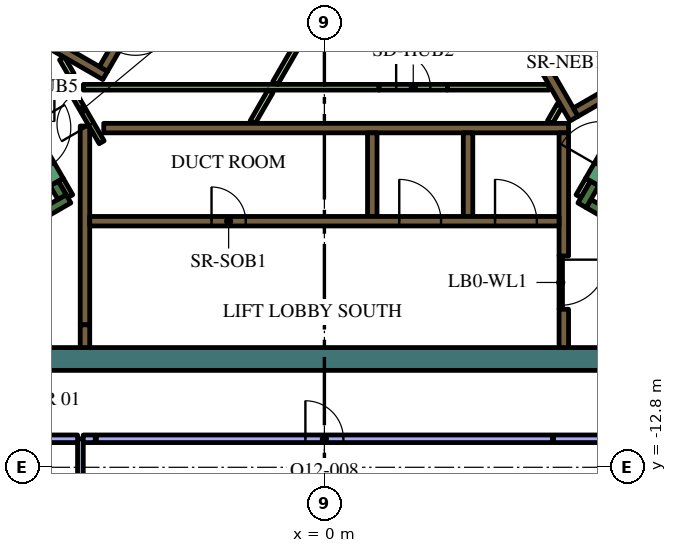
"""IFC4 building model, lengths in metres.
Left out: names, types, materials, properties, quantities, classifications, styles, units other than length and angle.
Written with IfcOpenShell. Run it as: python <this file> out.ifc"""

import sys

from ifc_helpers import new_model, si_unit, direction, frame, frame_2d, origin, place, context, subcontext, project, spatial, polyline, rectangle, outline, extrude, element, fill, save


model = new_model("IFC4")
c1 = context("Model", 3, precision=1e-05, world=origin(), true_north=direction((0.0, 1.0)))
c2 = subcontext(c1, "Body", "Model", "MODEL_VIEW")
j1 = project(units=[si_unit("LENGTHUNIT", "METRE"), si_unit("PLANEANGLEUNIT", "RADIAN")], contexts=[c1])
p1 = place(None, origin())
s1 = spatial("IfcSite", under=j1, at=p1, CompositionType="ELEMENT")
p2 = place(p1, origin())
s2 = spatial("IfcBuilding", under=s1, at=p2, CompositionType="ELEMENT")
p3 = place(p2, frame((0.0, 0.0, 283.8)))
s3 = spatial("IfcBuildingStorey", under=s2, at=p3, CompositionType="ELEMENT", Elevation=283.8)
p4 = place(p3, origin())
e1 = element("IfcWall", 1, at=p4, inside=s3, PredefinedType="SOLIDWALL", context=c2, shape_type="SweptSolid", body=[
    extrude(outline(polyline([(-15.502, -6.35), (-4.912, 11.992), (-4.393, 11.692), (-10.815, 0.569), (-10.84, 0.583), (-10.84, 0.583), (-10.84, 0.583), (-10.965, 0.367), (-10.965, 0.367), (-10.965, 0.367), (-10.94, 0.352), (-11.033, 0.191), (-14.809, -6.35), (-15.156, -6.95), (-15.502, -6.35)])), origin(), (0.0, 0.0, 1.0), 4.2),
])
p5 = place(p3, frame((-10.556, -9.95, 0.0), z_axis=(0.0, 0.0, 1.0), x_axis=(1.0, 0.0, 0.0)))
e2 = element("IfcWall", 2, at=p5, inside=s3, PredefinedType="SOLIDWALL", context=c2, shape_type="SweptSolid", body=[
    extrude(rectangle(XDim=19.461, YDim=0.6, at=frame_2d((9.73, 0.0))), origin(), (0.0, 0.0, 1.0), 4.2),
])
p6 = place(p3, frame((12.84, -9.261, 0.0), z_axis=(0.0, 0.0, 1.0), x_axis=(-0.866013990052, 0.500019768644, 0.0)))
e3 = element("IfcWall", 3, at=p6, inside=s3, PredefinedType="SOLIDWALL", context=c2, shape_type="SweptSolid", body=[
    extrude(rectangle(XDim=6.8, YDim=0.25, at=frame_2d((3.4, 0.0))), origin(), (0.0, 0.0, 1.0), 4.2),
])
p7 = place(p3, frame((7.113, -5.33, 0.0), z_axis=(0.0, 0.0, 1.0), x_axis=(-0.499965889992, -0.866045096311, 0.0)))
e4 = element("IfcWall", 4, at=p7, inside=s3, PredefinedType="SOLIDWALL", context=c2, shape_type="SweptSolid", body=[
    extrude(rectangle(XDim=0.666, YDim=0.25, at=frame_2d((0.333, 0.0))), origin(), (0.0, 0.0, 1.0), 4.2),
])
p8 = place(p3, frame((-12.84, -9.261, 0.0), z_axis=(0.0, 0.0, 1.0), x_axis=(0.866016039709, 0.500016218704, 0.0)))
e5 = element("IfcWall", 5, at=p8, inside=s3, PredefinedType="SOLIDWALL", context=c2, shape_type="SweptSolid", body=[
    extrude(rectangle(XDim=7.05, YDim=0.25, at=frame_2d((3.525, 0.0))), origin(), (0.0, 0.0, 1.0), 4.2),
])
p9 = place(p3, frame((-6.905, -5.69, 0.0), z_axis=(0.0, 0.0, 1.0), x_axis=(-0.499993700073, 0.866029041019, 0.0)))
e6 = element("IfcWall", 6, at=p9, inside=s3, PredefinedType="SOLIDWALL", context=c2, shape_type="SweptSolid", body=[
    extrude(rectangle(XDim=0.416, YDim=0.25, at=frame_2d((0.208, 0.0))), origin(), (0.0, 0.0, 1.0), 4.2),
])
p10 = place(p3, frame((-5.806, -3.875, 0.0), z_axis=(0.0, 0.0, 1.0), x_axis=(1.0, 0.0, 0.0)))
e7 = element("IfcWall", 7, at=p10, inside=s3, PredefinedType="SOLIDWALL", context=c2, shape_type="SweptSolid", body=[
    extrude(rectangle(XDim=12.231, YDim=0.25, at=frame_2d((6.116, 0.0))), origin(), (0.0, 0.0, 1.0), 4.2),
])
p11 = place(p3, frame((6.3, -7.24, 0.0), z_axis=(0.0, 0.0, 1.0), x_axis=(0.0, 1.0, 0.0)))
e8 = element("IfcWall", 8, at=p11, inside=s3, PredefinedType="SOLIDWALL", context=c2, shape_type="SweptSolid", body=[
    extrude(rectangle(XDim=3.24, YDim=0.25, at=frame_2d((1.62, 0.0))), origin(), (0.0, 0.0, 1.0), 4.2),
])
p12 = place(p3, frame((6.3, -9.65, 0.0), z_axis=(0.0, 0.0, 1.0), x_axis=(0.0, 1.0, 0.0)))
e9 = element("IfcWall", 9, at=p12, inside=s3, PredefinedType="SOLIDWALL", context=c2, shape_type="SweptSolid", body=[
    extrude(rectangle(XDim=1.008, YDim=0.25, at=frame_2d((0.504, 0.0))), origin(), (0.0, 0.0, 1.0), 4.2),
])
for number, where, z_axis, x_axis in (
    (10, (3.78, -4.0, 0.0), (0.0, 0.0, 1.0), (0.0, -1.0, 0.0)),
    (11, (1.26, -4.0, 0.0), (0.0, 0.0, 1.0), (0.0, -1.0, 0.0)),
):
    element("IfcWall", number, at=place(p3, frame(where, z_axis=z_axis, x_axis=x_axis)), inside=s3, PredefinedType="SOLIDWALL", context=c2, shape_type="SweptSolid", body=[
        extrude(rectangle(XDim=2.2, YDim=0.25, at=frame_2d((1.1, 0.0))), origin(), (0.0, 0.0, 1.0), 4.2),
    ])
p13 = place(p3, frame((-6.3, -9.05, 0.0), z_axis=(0.0, 0.0, 1.0), x_axis=(0.0, 1.0, 0.0)))
e12 = element("IfcWall", 12, at=p13, inside=s3, PredefinedType="SOLIDWALL", context=c2, shape_type="SweptSolid", body=[
    extrude(rectangle(XDim=5.23, YDim=0.25, at=frame_2d((2.615, 0.0))), origin(), (0.0, 0.0, 1.0), 4.2),
])
p14 = place(p3, frame((-6.3, -9.052, 0.0), z_axis=(0.0, 0.0, 1.0), x_axis=(0.0, -1.0, 0.0)))
e13 = element("IfcWall", 13, at=p14, inside=s3, PredefinedType="SOLIDWALL", context=c2, shape_type="SweptSolid", body=[
    extrude(rectangle(XDim=0.598, YDim=0.25, at=frame_2d((0.299, 0.0))), origin(), (0.0, 0.0, 1.0), 4.2),
])
e14 = element("IfcWall", 14, at=p4, inside=s3, PredefinedType="SOLIDWALL", context=c2, shape_type="SweptSolid", body=[
    extrude(outline(polyline([(0.332, 6.925), (0.335, 6.925), (0.335, 6.925), (0.335, 6.925), (0.335, 7.075), (0.335, 7.075), (0.335, 7.075), (0.245, 7.075), (0.035, 7.439), (0.252, 7.564), (0.377, 7.348), (1.512, 5.382), (1.637, 5.165), (2.221, 4.153), (2.771, 3.199), (2.896, 2.983), (3.138, 2.564), (4.031, 1.017), (4.156, 0.801), (5.292, -1.165), (5.417, -1.382), (6.073, -2.519), (6.552, -3.348), (6.677, -3.564), (6.46, -3.689), (0.332, 6.925)])), origin(), (0.0, 0.0, 1.0), 4.2),
])
p15 = place(p3, frame((11.507, -0.631, 0.0), z_axis=(0.0, 0.0, 1.0), x_axis=(-0.866011447264, -0.500024172624, 0.0)))
e15 = element("IfcWall", 15, at=p15, inside=s3, PredefinedType="SOLIDWALL", context=c2, shape_type="SweptSolid", body=[
    extrude(rectangle(XDim=5.65, YDim=0.25, at=frame_2d((2.825, 0.0))), origin(), (0.0, 0.0, 1.0), 4.2),
])
p16 = place(p3, frame((-7.889, -1.265, 0.0), z_axis=(0.0, 0.0, 1.0), x_axis=(0.866057815567, -0.499943856944, 0.0)))
e16 = element("IfcWall", 16, at=p16, inside=s3, PredefinedType="SOLIDWALL", context=c2, shape_type="SweptSolid", body=[
    extrude(rectangle(XDim=2.45, YDim=0.25, at=frame_2d((1.225, 0.0))), origin(), (0.0, 0.0, 1.0), 4.2),
])
p17 = place(p3, frame((1.438, -2.8, 0.0), z_axis=(0.0, 0.0, 1.0), x_axis=(-1.0, 0.0, 0.0)))
e17 = element("IfcWall", 17, at=p17, inside=s3, PredefinedType="PARTITIONING", context=c2, shape_type="SweptSolid", body=[
    extrude(rectangle(XDim=7.781, YDim=0.15, at=frame_2d((3.891, 0.0))), origin(), (0.0, 0.0, 1.0), 3.55),
])
p18 = place(p3, frame((-1.418, -2.907, 0.0), z_axis=(0.0, 0.0, 1.0), x_axis=(-0.499978056798, -0.866038072327, 0.0)))
e18 = element("IfcWall", 18, at=p18, inside=s3, PredefinedType="PARTITIONING", context=c2, shape_type="SweptSolid", body=[
    extrude(rectangle(XDim=0.937, YDim=0.15, at=frame_2d((0.469, 0.0))), origin(), (0.0, 0.0, 1.0), 3.55),
])
for number, where, z_axis, x_axis in (
    (19, (-1.295, -2.693, 0.0), (0.0, 0.0, 1.0), (0.5, 0.866, 0.0)),
    (20, (3.238, -2.8, 0.0), (0.0, 0.0, 1.0), (1.0, 0.0, 0.0)),
):
    element("IfcWall", number, at=place(p3, frame(where, z_axis=z_axis, x_axis=x_axis)), inside=s3, PredefinedType="PARTITIONING", context=c2, shape_type="SweptSolid", body=[
        extrude(rectangle(XDim=2.672, YDim=0.15, at=frame_2d((1.336, 0.0))), origin(), (0.0, 0.0, 1.0), 3.55),
    ])
p19 = place(p3, frame((-6.653, -2.477, 0.0), z_axis=(0.0, 0.0, 1.0), x_axis=(-0.500002592159, 0.866023907196, 0.0)))
e21 = element("IfcWall", 21, at=p19, inside=s3, PredefinedType="PARTITIONING", context=c2, shape_type="SweptSolid", body=[
    extrude(rectangle(XDim=0.503, YDim=0.15, at=frame_2d((0.251, 0.0))), origin(), (0.0, 0.0, 1.0), 3.55),
])
p20 = place(p3, frame((-6.94, -5.23, 0.0), z_axis=(0.0, 0.0, 1.0), x_axis=(0.499834152157, -0.86612113491, 0.0)))
e22 = element("IfcWall", 22, at=p20, inside=s3, PredefinedType="PARTITIONING", context=c2, shape_type="SweptSolid", body=[
    extrude(rectangle(XDim=0.505, YDim=0.15, at=frame_2d((0.252, 0.0))), origin(), (0.0, 0.0, 1.0), 4.2),
])
p21 = place(p3, frame((6.688, -5.667, 0.0), z_axis=(0.0, 0.0, 1.0), x_axis=(0.499834152157, 0.86612113491, 0.0)))
e23 = element("IfcWall", 23, at=p21, inside=s3, PredefinedType="PARTITIONING", context=c2, shape_type="SweptSolid", body=[
    extrude(rectangle(XDim=0.505, YDim=0.15, at=frame_2d((0.252, 0.0))), origin(), (0.0, 0.0, 1.0), 3.55),
])
p22 = place(p3, frame((5.936, -3.718, 0.0), z_axis=(0.0, 0.0, 1.0), x_axis=(0.499890179513, 0.866088799389, 0.0)))
e24 = element("IfcWall", 24, at=p22, inside=s3, PredefinedType="PARTITIONING", context=c2, shape_type="SweptSolid", body=[
    extrude(rectangle(XDim=0.504, YDim=0.15, at=frame_2d((0.252, 0.0))), origin(), (0.0, 0.0, 1.0), 3.55),
])
p23 = place(p3, frame((-6.175, -6.325, 0.0), z_axis=(0.0, 0.0, 1.0), x_axis=(1.0, 0.0, 0.0)))
e25 = element("IfcWall", 25, at=p23, inside=s3, PredefinedType="SOLIDWALL", context=c2, shape_type="SweptSolid", body=[
    extrude(rectangle(XDim=12.35, YDim=0.25, at=frame_2d((6.175, 0.0))), origin(), (0.0, 0.0, 1.0), 4.2),
])
p24 = place(p23, frame((3.205, 0.0, 0.0)))
e26 = element("IfcOpeningElement", 26, at=p24, cuts=e25, PredefinedType="OPENING", context=c2, shape_type="SweptSolid", body=[
    extrude(rectangle(XDim=0.9, YDim=2.1, at=frame_2d((0.45, 1.05))), frame((0.0, 0.135, 0.0), z_axis=(0.0, -1.0, 0.0), x_axis=(1.0, 0.0, 0.0)), (0.0, 0.0, 1.0), 0.27),
])
p25 = place(p23, frame((8.145, 0.0, 0.0)))
e27 = element("IfcOpeningElement", 27, at=p25, cuts=e25, PredefinedType="OPENING", context=c2, shape_type="SweptSolid", body=[
    extrude(rectangle(XDim=1.1, YDim=2.1, at=frame_2d((0.55, 1.05))), frame((0.0, 0.135, 0.0), z_axis=(0.0, -1.0, 0.0), x_axis=(1.0, 0.0, 0.0)), (0.0, 0.0, 1.0), 0.27),
])
p26 = place(p23, frame((10.665, 0.0, 0.0)))
e28 = element("IfcOpeningElement", 28, at=p26, cuts=e25, PredefinedType="OPENING", context=c2, shape_type="SweptSolid", body=[
    extrude(rectangle(XDim=1.1, YDim=2.1, at=frame_2d((0.55, 1.05))), frame((0.0, 0.135, 0.0), z_axis=(0.0, -1.0, 0.0), x_axis=(1.0, 0.0, 0.0)), (0.0, 0.0, 1.0), 0.27),
])
p27 = place(p3, frame((8.565, -2.185, 0.0), z_axis=(0.0, 0.0, 1.0), x_axis=(-0.499997954832, 0.866026584559, 0.0)))
e29 = element("IfcWall", 29, at=p27, inside=s3, PredefinedType="SOLIDWALL", context=c2, shape_type="SweptSolid", body=[
    extrude(rectangle(XDim=12.35, YDim=0.25, at=frame_2d((6.175, 0.0))), origin(), (0.0, 0.0, 1.0), 4.2),
])
p28 = place(p27, frame((0.685, 0.0, 0.0)))
e30 = element("IfcOpeningElement", 30, at=p28, cuts=e29, PredefinedType="OPENING", context=c2, shape_type="SweptSolid", body=[
    extrude(rectangle(XDim=0.9, YDim=2.1, at=frame_2d((0.45, 1.05))), frame((0.0, 0.135, 0.0), z_axis=(0.0, -1.0, 0.0), x_axis=(1.0, 0.0, 0.0)), (0.0, 0.0, 1.0), 0.27),
])
p29 = place(p27, frame((3.105, 0.0, 0.0)))
e31 = element("IfcOpeningElement", 31, at=p29, cuts=e29, PredefinedType="OPENING", context=c2, shape_type="SweptSolid", body=[
    extrude(rectangle(XDim=1.1, YDim=2.1, at=frame_2d((0.55, 1.05))), frame((0.0, 0.135, 0.0), z_axis=(0.0, -1.0, 0.0), x_axis=(1.0, 0.0, 0.0)), (0.0, 0.0, 1.0), 0.27),
])
p30 = place(p27, frame((5.625, 0.0, 0.0)))
e32 = element("IfcOpeningElement", 32, at=p30, cuts=e29, PredefinedType="OPENING", context=c2, shape_type="SweptSolid", body=[
    extrude(rectangle(XDim=1.1, YDim=2.1, at=frame_2d((0.55, 1.05))), frame((0.0, 0.135, 0.0), z_axis=(0.0, -1.0, 0.0), x_axis=(1.0, 0.0, 0.0)), (0.0, 0.0, 1.0), 0.27),
])
p31 = place(p27, frame((8.145, 0.0, 0.0)))
e33 = element("IfcOpeningElement", 33, at=p31, cuts=e29, PredefinedType="OPENING", context=c2, shape_type="SweptSolid", body=[
    extrude(rectangle(XDim=1.1, YDim=2.1, at=frame_2d((0.55, 1.05))), frame((0.0, 0.135, 0.0), z_axis=(0.0, -1.0, 0.0), x_axis=(1.0, 0.0, 0.0)), (0.0, 0.0, 1.0), 0.27),
])
p32 = place(p27, frame((10.665, 0.0, 0.0)))
e34 = element("IfcOpeningElement", 34, at=p32, cuts=e29, PredefinedType="OPENING", context=c2, shape_type="SweptSolid", body=[
    extrude(rectangle(XDim=1.1, YDim=2.1, at=frame_2d((0.55, 1.05))), frame((0.0, 0.135, 0.0), z_axis=(0.0, -1.0, 0.0), x_axis=(1.0, 0.0, 0.0)), (0.0, 0.0, 1.0), 0.27),
])
p33 = place(p3, frame((-0.898, 6.194, 0.0), z_axis=(0.0, 0.0, 1.0), x_axis=(-0.499996202215, -0.866027596426, 0.0)))
e35 = element("IfcWall", 35, at=p33, inside=s3, PredefinedType="SOLIDWALL", context=c2, shape_type="SweptSolid", body=[
    extrude(rectangle(XDim=9.83, YDim=0.25, at=frame_2d((4.915, 0.0))), origin(), (0.0, 0.0, 1.0), 4.2),
])
p34 = place(p33, frame((0.585, 0.0, 0.0)))
e36 = element("IfcOpeningElement", 36, at=p34, cuts=e35, PredefinedType="OPENING", context=c2, shape_type="SweptSolid", body=[
    extrude(rectangle(XDim=1.1, YDim=2.1, at=frame_2d((0.55, 1.05))), frame((0.0, 0.135, 0.0), z_axis=(0.0, -1.0, 0.0), x_axis=(1.0, 0.0, 0.0)), (0.0, 0.0, 1.0), 0.27),
])
p35 = place(p33, frame((3.105, 0.0, 0.0)))
e37 = element("IfcOpeningElement", 37, at=p35, cuts=e35, PredefinedType="OPENING", context=c2, shape_type="SweptSolid", body=[
    extrude(rectangle(XDim=1.1, YDim=2.1, at=frame_2d((0.55, 1.05))), frame((0.0, 0.135, 0.0), z_axis=(0.0, -1.0, 0.0), x_axis=(1.0, 0.0, 0.0)), (0.0, 0.0, 1.0), 0.27),
])
p36 = place(p33, frame((5.625, 0.0, 0.0)))
e38 = element("IfcOpeningElement", 38, at=p36, cuts=e35, PredefinedType="OPENING", context=c2, shape_type="SweptSolid", body=[
    extrude(rectangle(XDim=1.1, YDim=2.1, at=frame_2d((0.55, 1.05))), frame((0.0, 0.135, 0.0), z_axis=(0.0, -1.0, 0.0), x_axis=(1.0, 0.0, 0.0)), (0.0, 0.0, 1.0), 0.27),
])
p37 = place(p33, frame((8.145, 0.0, 0.0)))
e39 = element("IfcOpeningElement", 39, at=p37, cuts=e35, PredefinedType="OPENING", context=c2, shape_type="SweptSolid", body=[
    extrude(rectangle(XDim=1.1, YDim=2.1, at=frame_2d((0.55, 1.05))), frame((0.0, 0.135, 0.0), z_axis=(0.0, -1.0, 0.0), x_axis=(1.0, 0.0, 0.0)), (0.0, 0.0, 1.0), 0.27),
])
p38 = place(p3, frame((7.048, -5.292, 0.0), z_axis=(0.0, 0.0, 1.0), x_axis=(0.49994051562, 0.866059744384, 0.0)))
e40 = element("IfcWall", 40, at=p38, inside=s3, PredefinedType="SOLIDWALL", context=c2, shape_type="SweptSolid", body=[
    extrude(rectangle(XDim=2.1, YDim=0.4, at=frame_2d((1.05, 0.0))), origin(), (0.0, 0.0, 1.0), 4.2),
])
p39 = place(p38, frame((0.45, 0.0, 0.0)))
e41 = element("IfcOpeningElement", 41, at=p39, cuts=e40, PredefinedType="OPENING", context=c2, shape_type="SweptSolid", body=[
    extrude(rectangle(XDim=1.2, YDim=2.1, at=frame_2d((0.6, 1.05))), frame((0.0, 0.21, 0.0), z_axis=(0.0, -1.0, 0.0), x_axis=(1.0, 0.0, 0.0)), (0.0, 0.0, 1.0), 0.42),
])
p40 = place(p3, frame((-8.098, -3.474, 0.0), z_axis=(0.0, 0.0, 1.0), x_axis=(0.49994051562, -0.866059744384, 0.0)))
e42 = element("IfcWall", 42, at=p40, inside=s3, PredefinedType="SOLIDWALL", context=c2, shape_type="SweptSolid", body=[
    extrude(rectangle(XDim=2.1, YDim=0.4, at=frame_2d((1.05, 0.0))), origin(), (0.0, 0.0, 1.0), 4.2),
])
p41 = place(p40, frame((0.45, 0.0, 0.0)))
e43 = element("IfcOpeningElement", 43, at=p41, cuts=e42, PredefinedType="OPENING", context=c2, shape_type="SweptSolid", body=[
    extrude(rectangle(XDim=1.2, YDim=2.1, at=frame_2d((0.6, 1.05))), frame((0.0, 0.21, 0.0), z_axis=(0.0, -1.0, 0.0), x_axis=(1.0, 0.0, 0.0)), (0.0, 0.0, 1.0), 0.42),
])
p42 = place(p3, frame((-5.861, -4.248, 0.0), z_axis=(0.0, 0.0, 1.0), x_axis=(-0.500043646338, 0.866000203093, 0.0)))
e44 = element("IfcWall", 44, at=p42, inside=s3, PredefinedType="PARTITIONING", context=c2, shape_type="SweptSolid", body=[
    extrude(rectangle(XDim=1.93, YDim=0.15, at=frame_2d((0.965, 0.0))), origin(), (0.0, 0.0, 1.0), 4.2),
])
p43 = place(p42, frame((0.55, 0.0, 0.0)))
e45 = element("IfcOpeningElement", 45, at=p43, cuts=e44, PredefinedType="OPENING", context=c2, shape_type="SweptSolid", body=[
    extrude(rectangle(XDim=0.9, YDim=2.1, at=frame_2d((0.45, 1.05))), frame((0.0, 0.085, 0.0), z_axis=(0.0, -1.0, 0.0), x_axis=(1.0, 0.0, 0.0)), (0.0, 0.0, 1.0), 0.17),
])
p44 = place(p3, frame((6.22, -7.237, 0.0), z_axis=(0.0, 0.0, 1.0), x_axis=(0.0, -1.0, 0.0)))
e46 = element("IfcWall", 46, at=p44, inside=s3, PredefinedType="PARTITIONING", context=c2, shape_type="SweptSolid", body=[
    extrude(rectangle(XDim=1.4, YDim=0.09, at=frame_2d((0.7, 0.0))), origin(), (0.0, 0.0, 1.0), 3.55),
])
p45 = place(p44, frame((0.1, 0.0, 0.0)))
e47 = element("IfcOpeningElement", 47, at=p45, cuts=e46, PredefinedType="OPENING", context=c2, shape_type="SweptSolid", body=[
    extrude(rectangle(XDim=1.2, YDim=2.1, at=frame_2d((0.6, 1.05))), frame((0.0, 0.055, 0.0), z_axis=(0.0, -1.0, 0.0), x_axis=(1.0, 0.0, 0.0)), (0.0, 0.0, 1.0), 0.11),
])
p46 = place(p3, frame((1.438, -2.8, 0.0), z_axis=(0.0, 0.0, 1.0), x_axis=(1.0, 0.0, 0.0)))
e48 = element("IfcWall", 48, at=p46, inside=s3, PredefinedType="PARTITIONING", context=c2, shape_type="SweptSolid", body=[
    extrude(rectangle(XDim=1.8, YDim=0.15, at=frame_2d((0.9, 0.0))), origin(), (0.0, 0.0, 1.0), 3.55),
])
p47 = place(p46, frame((0.45, 0.0, 0.0)))
e49 = element("IfcOpeningElement", 49, at=p47, cuts=e48, PredefinedType="OPENING", context=c2, shape_type="SweptSolid", body=[
    extrude(rectangle(XDim=0.9, YDim=2.1, at=frame_2d((0.45, 1.05))), frame((0.0, 0.085, 0.0), z_axis=(0.0, -1.0, 0.0), x_axis=(1.0, 0.0, 0.0)), (0.0, 0.0, 1.0), 0.17),
])
p48 = place(p3, frame((-6.655, -2.8, 0.0), z_axis=(0.0, 0.0, 1.0), x_axis=(-1.0, 0.0, 0.0)))
e50 = element("IfcWall", 50, at=p48, inside=s3, PredefinedType="PARTITIONING", context=c2, shape_type="SweptSolid", body=[
    extrude(rectangle(XDim=1.8, YDim=0.15, at=frame_2d((0.9, 0.0))), origin(), (0.0, 0.0, 1.0), 3.55),
])
p49 = place(p48, frame((0.45, 0.0, 0.0)))
e51 = element("IfcOpeningElement", 51, at=p49, cuts=e50, PredefinedType="OPENING", context=c2, shape_type="SweptSolid", body=[
    extrude(rectangle(XDim=0.9, YDim=2.1, at=frame_2d((0.45, 1.05))), frame((0.0, 0.085, 0.0), z_axis=(0.0, -1.0, 0.0), x_axis=(1.0, 0.0, 0.0)), (0.0, 0.0, 1.0), 0.17),
])
p50 = place(p3, frame((-6.42, -15.021, 0.0), z_axis=(0.0, 0.0, 1.0), x_axis=(0.0, 1.0, 0.0)))
e52 = element("IfcWall", 52, at=p50, inside=s3, PredefinedType="PARTITIONING", context=c2, shape_type="SweptSolid", body=[
    extrude(rectangle(XDim=2.971, YDim=0.15, at=frame_2d((1.485, 0.0))), origin(), (0.0, 0.0, 1.0), 3.55),
])
p51 = place(p50, frame((1.071, 0.0, 0.0)))
e53 = element("IfcOpeningElement", 53, at=p51, cuts=e52, PredefinedType="OPENING", context=c2, shape_type="SweptSolid", body=[
    extrude(rectangle(XDim=0.9, YDim=2.1, at=frame_2d((0.45, 1.05))), frame((0.0, 0.085, 0.0), z_axis=(0.0, -1.0, 0.0), x_axis=(1.0, 0.0, 0.0)), (0.0, 0.0, 1.0), 0.17),
])
p52 = place(p3, frame((-13.799, -12.05, 0.0), z_axis=(0.0, 0.0, 1.0), x_axis=(1.0, 0.0, 0.0)))
e54 = element("IfcWall", 54, at=p52, inside=s3, PredefinedType="PARTITIONING", context=c2, shape_type="SweptSolid", body=[
    extrude(rectangle(XDim=7.303, YDim=0.2, at=frame_2d((3.652, 0.0))), origin(), (0.0, 0.0, 1.0), 3.55),
])
p53 = place(p3, frame((-6.0, -12.05, 0.0), z_axis=(0.0, 0.0, 1.0), x_axis=(1.0, 0.0, 0.0)))
e55 = element("IfcWall", 55, at=p53, inside=s3, PredefinedType="PARTITIONING", context=c2, shape_type="SweptSolid", body=[
    extrude(rectangle(XDim=12.0, YDim=0.2, at=frame_2d((6.0, 0.0))), origin(), (0.0, 0.0, 1.0), 3.55),
])
p54 = place(p53, frame((5.5, 0.0, 0.0)))
e56 = element("IfcOpeningElement", 56, at=p54, cuts=e55, PredefinedType="OPENING", context=c2, shape_type="SweptSolid", body=[
    extrude(rectangle(XDim=1.0, YDim=2.1, at=frame_2d((0.5, 1.05))), frame((0.0, 0.11, 0.0), z_axis=(0.0, -1.0, 0.0), x_axis=(1.0, 0.0, 0.0)), (0.0, 0.0, 1.0), 0.22),
])
p55 = place(p3, frame((-6.345, -12.05, 0.0), z_axis=(0.0, 0.0, 1.0), x_axis=(1.0, 0.0, 0.0)))
e57 = element("IfcWall", 57, at=p55, inside=s3, PredefinedType="PARTITIONING", context=c2, shape_type="SweptSolid", body=[
    extrude(rectangle(XDim=0.315, YDim=0.2, at=frame_2d((0.158, 0.0))), origin(), (0.0, 0.0, 1.0), 3.55),
])
p56 = place(p3, frame((6.03, -12.05, 0.0), z_axis=(0.0, 0.0, 1.0), x_axis=(1.0, 0.0, 0.0)))
e58 = element("IfcWall", 58, at=p56, inside=s3, PredefinedType="PARTITIONING", context=c2, shape_type="SweptSolid", body=[
    extrude(rectangle(XDim=8.259, YDim=0.2, at=frame_2d((4.13, 0.0))), origin(), (0.0, 0.0, 1.0), 3.55),
])
p57 = place(p24, origin())
e59 = element("IfcDoor", 59, at=p57, inside=s3, OperationType="SINGLE_SWING_LEFT", PredefinedType="DOOR", context=c2, shape_type="SweptSolid", body=[
    extrude(rectangle(XDim=0.9, YDim=2.1, at=frame_2d((0.45, 1.05))), frame((0.0, 0.025, 0.0), z_axis=(0.0, -1.0, 0.0), x_axis=(1.0, 0.0, 0.0)), (0.0, 0.0, 1.0), 0.05),
])
fill(e26, e59)
p58 = place(p25, origin())
e60 = element("IfcDoor", 60, at=p58, inside=s3, OperationType="DOUBLE_DOOR_SLIDING", PredefinedType="DOOR", context=c2, shape_type="SweptSolid", body=[
    extrude(rectangle(XDim=1.1, YDim=2.1, at=frame_2d((0.55, 1.05))), frame((0.0, 0.025, 0.0), z_axis=(0.0, -1.0, 0.0), x_axis=(1.0, 0.0, 0.0)), (0.0, 0.0, 1.0), 0.05),
])
fill(e27, e60)
p59 = place(p26, origin())
e61 = element("IfcDoor", 61, at=p59, inside=s3, OperationType="DOUBLE_DOOR_SLIDING", PredefinedType="DOOR", context=c2, shape_type="SweptSolid", body=[
    extrude(rectangle(XDim=1.1, YDim=2.1, at=frame_2d((0.55, 1.05))), frame((0.0, 0.025, 0.0), z_axis=(0.0, -1.0, 0.0), x_axis=(1.0, 0.0, 0.0)), (0.0, 0.0, 1.0), 0.05),
])
fill(e28, e61)
p60 = place(p43, origin())
e62 = element("IfcDoor", 62, at=p60, inside=s3, OperationType="SINGLE_SWING_LEFT", PredefinedType="DOOR", context=c2, shape_type="SweptSolid", body=[
    extrude(rectangle(XDim=0.9, YDim=2.1, at=frame_2d((0.45, 1.05))), frame((0.0, 0.025, 0.0), z_axis=(0.0, -1.0, 0.0), x_axis=(1.0, 0.0, 0.0)), (0.0, 0.0, 1.0), 0.05),
])
fill(e45, e62)
p61 = place(p45, origin())
e63 = element("IfcDoor", 63, at=p61, inside=s3, OperationType="SINGLE_SWING_LEFT", PredefinedType="DOOR", context=c2, shape_type="SweptSolid", body=[
    extrude(rectangle(XDim=1.2, YDim=2.1, at=frame_2d((0.6, 1.05))), frame((0.0, 0.025, 0.0), z_axis=(0.0, -1.0, 0.0), x_axis=(1.0, 0.0, 0.0)), (0.0, 0.0, 1.0), 0.05),
])
fill(e47, e63)
p62 = place(p47, origin())
e64 = element("IfcDoor", 64, at=p62, inside=s3, OperationType="SINGLE_SWING_LEFT", PredefinedType="DOOR", context=c2, shape_type="SweptSolid", body=[
    extrude(rectangle(XDim=0.9, YDim=2.1, at=frame_2d((0.45, 1.05))), frame((0.0, 0.025, 0.0), z_axis=(0.0, -1.0, 0.0), x_axis=(1.0, 0.0, 0.0)), (0.0, 0.0, 1.0), 0.05),
])
fill(e49, e64)
p63 = place(p49, origin())
e65 = element("IfcDoor", 65, at=p63, inside=s3, OperationType="SINGLE_SWING_LEFT", PredefinedType="DOOR", context=c2, shape_type="SweptSolid", body=[
    extrude(rectangle(XDim=0.9, YDim=2.1, at=frame_2d((0.45, 1.05))), frame((0.0, 0.025, 0.0), z_axis=(0.0, -1.0, 0.0), x_axis=(1.0, 0.0, 0.0)), (0.0, 0.0, 1.0), 0.05),
])
fill(e51, e65)
p64 = place(p54, origin())
e66 = element("IfcDoor", 66, at=p64, inside=s3, OperationType="SINGLE_SWING_RIGHT", PredefinedType="DOOR", context=c2, shape_type="SweptSolid", body=[
    extrude(rectangle(XDim=1.0, YDim=2.1, at=frame_2d((0.5, 1.05))), frame((0.0, 0.025, 0.0), z_axis=(0.0, -1.0, 0.0), x_axis=(1.0, 0.0, 0.0)), (0.0, 0.0, 1.0), 0.05),
])
fill(e56, e66)
save(model, sys.argv[1])
